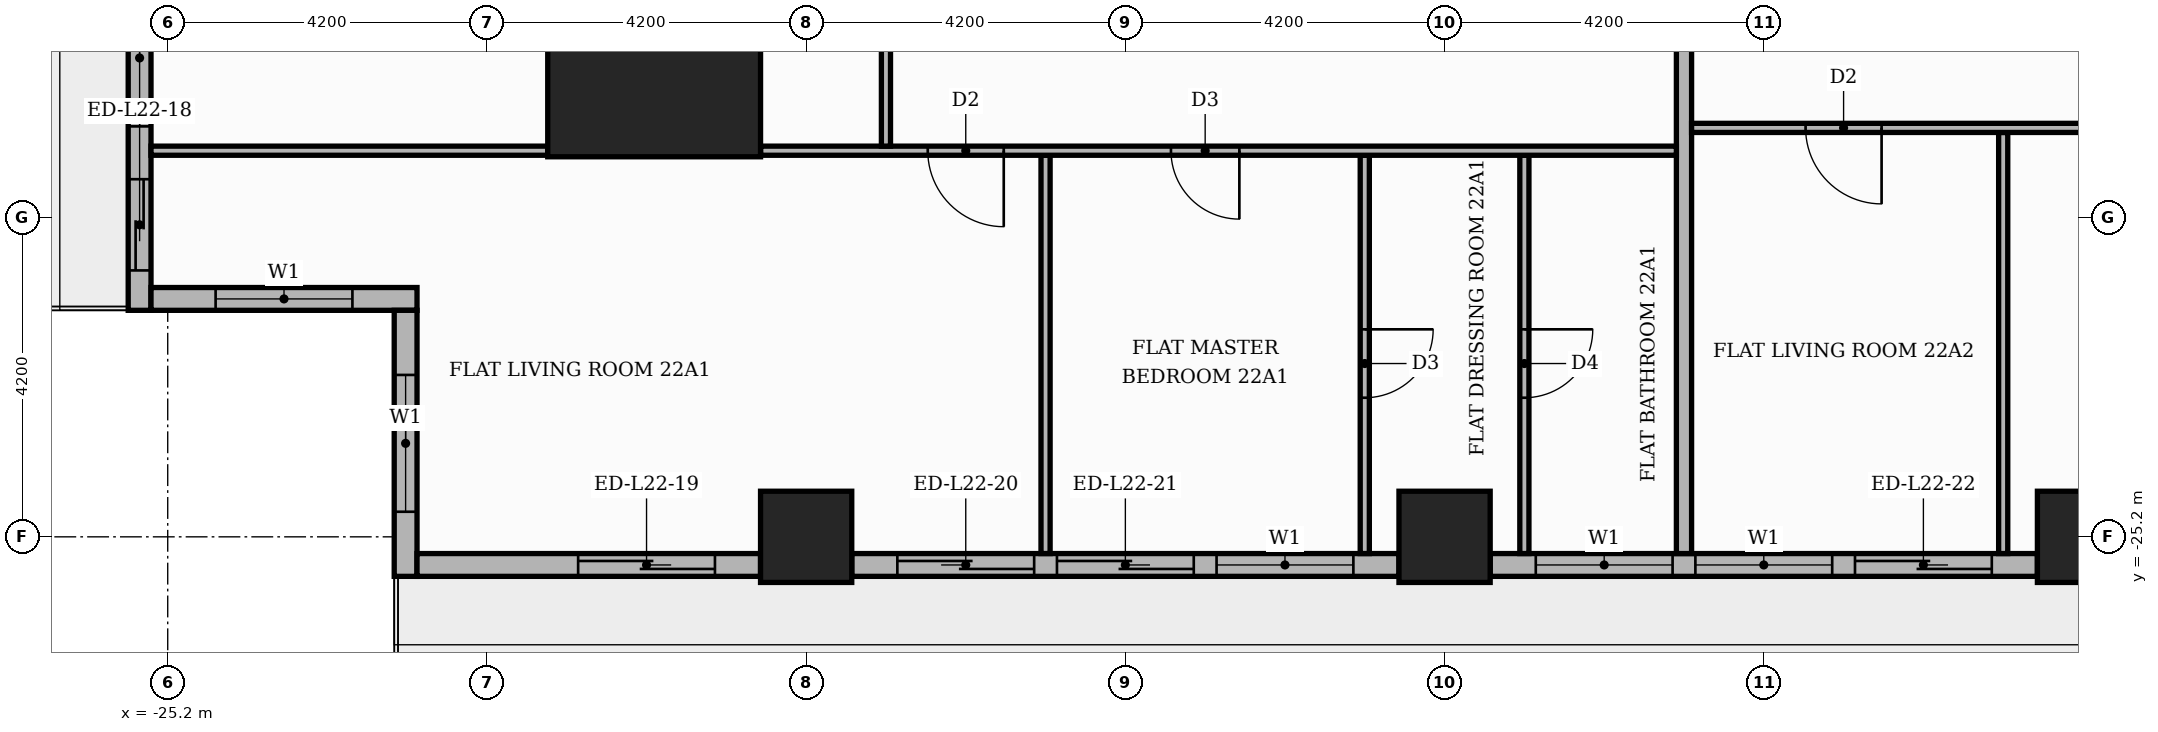
"""IFC4 building model, lengths in metres.
Left out: names, types, materials, properties, quantities, classifications, styles, units other than length and angle.
Written with IfcOpenShell. Run it as: python <this file> out.ifc"""

import sys

from ifc_helpers import new_model, si_unit, direction, frame, frame_2d, origin, origin_2d, place, context, subcontext, project, spatial, rectangle, extrude, element, fill, save


model = new_model("IFC4")
c1 = context("Model", 3, precision=1e-05, world=origin(), true_north=direction((0.0, 1.0)))
c2 = subcontext(c1, "Body", "Model", "MODEL_VIEW")
j1 = project(units=[si_unit("LENGTHUNIT", "METRE"), si_unit("PLANEANGLEUNIT", "RADIAN")], contexts=[c1])
p1 = place(None, origin())
s1 = spatial("IfcSite", under=j1, at=p1, CompositionType="ELEMENT")
p2 = place(p1, origin())
s2 = spatial("IfcBuilding", under=s1, at=p2, CompositionType="ELEMENT")
p3 = place(p2, frame((0.0, 0.0, 94.8)))
s3 = spatial("IfcBuildingStorey", under=s2, at=p3, CompositionType="ELEMENT", Elevation=94.8)
p4 = place(p3, frame((-18.8, -18.8, 0.0), z_axis=(0.0, 0.0, 1.0), x_axis=(1.0, 0.0, 0.0)))
e1 = element("IfcColumn", 1, at=p4, inside=s3, PredefinedType="COLUMN", context=c2, shape_type="SweptSolid", body=[
    extrude(rectangle(XDim=2.8, YDim=2.8, at=origin_2d()), origin(), (0.0, 0.0, 1.0), 3.9),
])
for number, where, z_axis, x_axis in (
    (2, (0.0, -25.2, 0.0), (0.0, 0.0, 1.0), (1.0, 0.0, 0.0)),
    (3, (-8.4, -25.2, 0.0), (0.0, 0.0, 1.0), (1.0, 0.0, 0.0)),
    (4, (-16.8, -25.2, 0.0), (0.0, 0.0, 1.0), (1.0, 0.0, 0.0)),
):
    element("IfcColumn", number, at=place(p3, frame(where, z_axis=z_axis, x_axis=x_axis)), inside=s3, PredefinedType="COLUMN", context=c2, shape_type="SweptSolid", body=[
        extrude(rectangle(XDim=1.2, YDim=1.2, at=origin_2d()), origin(), (0.0, 0.0, 1.0), 3.9),
    ])
p5 = place(p3, frame((-25.57, -17.4, 0.0), z_axis=(0.0, 0.0, 1.0), x_axis=(0.0, -1.0, 0.0)))
e5 = element("IfcWall", 5, at=p5, inside=s3, PredefinedType="STANDARD", context=c2, shape_type="SweptSolid", body=[
    extrude(rectangle(XDim=4.82, YDim=0.3, at=frame_2d((2.41, 0.0))), origin(), (0.0, 0.0, 1.0), 3.48),
])
p6 = place(p5, frame((0.6, 0.0, 0.9)))
e6 = element("IfcOpeningElement", 6, at=p6, cuts=e5, PredefinedType="OPENING", context=c2, shape_type="SweptSolid", body=[
    extrude(rectangle(XDim=1.8, YDim=2.1, at=frame_2d((0.9, 1.05))), frame((0.0, 0.16, 0.0), z_axis=(0.0, -1.0, 0.0), x_axis=(1.0, 0.0, 0.0)), (0.0, 0.0, 1.0), 0.32),
])
p7 = place(p5, frame((3.095, 0.0, 0.0)))
e7 = element("IfcOpeningElement", 7, at=p7, cuts=e5, PredefinedType="OPENING", context=c2, shape_type="SweptSolid", body=[
    extrude(rectangle(XDim=1.2, YDim=2.4, at=frame_2d((0.6, 1.2))), frame((0.0, 0.16, 0.0), z_axis=(0.0, -1.0, 0.0), x_axis=(1.0, 0.0, 0.0)), (0.0, 0.0, 1.0), 0.32),
])
p8 = place(p3, frame((-25.42, -22.07, 0.0), z_axis=(0.0, 0.0, 1.0), x_axis=(1.0, 0.0, 0.0)))
e8 = element("IfcWall", 8, at=p8, inside=s3, PredefinedType="STANDARD", context=c2, shape_type="SweptSolid", body=[
    extrude(rectangle(XDim=3.5, YDim=0.3, at=frame_2d((1.75, 0.0))), origin(), (0.0, 0.0, 1.0), 3.48),
])
p9 = place(p8, frame((0.85, 0.0, 0.9)))
e9 = element("IfcOpeningElement", 9, at=p9, cuts=e8, PredefinedType="OPENING", context=c2, shape_type="SweptSolid", body=[
    extrude(rectangle(XDim=1.8, YDim=2.1, at=frame_2d((0.9, 1.05))), frame((0.0, 0.16, 0.0), z_axis=(0.0, -1.0, 0.0), x_axis=(1.0, 0.0, 0.0)), (0.0, 0.0, 1.0), 0.32),
])
p10 = place(p3, frame((-22.07, -22.22, 0.0), z_axis=(0.0, 0.0, 1.0), x_axis=(0.0, -1.0, 0.0)))
e10 = element("IfcWall", 10, at=p10, inside=s3, PredefinedType="STANDARD", context=c2, shape_type="SweptSolid", body=[
    extrude(rectangle(XDim=3.5, YDim=0.3, at=frame_2d((1.75, 0.0))), origin(), (0.0, 0.0, 1.0), 3.48),
])
p11 = place(p10, frame((0.85, 0.0, 0.9)))
e11 = element("IfcOpeningElement", 11, at=p11, cuts=e10, PredefinedType="OPENING", context=c2, shape_type="SweptSolid", body=[
    extrude(rectangle(XDim=1.8, YDim=2.1, at=frame_2d((0.9, 1.05))), frame((0.0, 0.16, 0.0), z_axis=(0.0, -1.0, 0.0), x_axis=(1.0, 0.0, 0.0)), (0.0, 0.0, 1.0), 0.32),
])
p12 = place(p3, frame((-21.92, -25.57, 0.0), z_axis=(0.0, 0.0, 1.0), x_axis=(1.0, 0.0, 0.0)))
e12 = element("IfcWall", 12, at=p12, inside=s3, PredefinedType="STANDARD", context=c2, shape_type="SweptSolid", body=[
    extrude(rectangle(XDim=4.52, YDim=0.3, at=frame_2d((2.26, 0.0))), origin(), (0.0, 0.0, 1.0), 3.48),
])
p13 = place(p12, frame((2.12, 0.0, 0.0)))
e13 = element("IfcOpeningElement", 13, at=p13, cuts=e12, PredefinedType="OPENING", context=c2, shape_type="SweptSolid", body=[
    extrude(rectangle(XDim=1.8, YDim=2.4, at=frame_2d((0.9, 1.2))), frame((0.0, 0.16, 0.0), z_axis=(0.0, -1.0, 0.0), x_axis=(1.0, 0.0, 0.0)), (0.0, 0.0, 1.0), 0.32),
])
p14 = place(p3, frame((-16.2, -25.57, 0.0), z_axis=(0.0, 0.0, 1.0), x_axis=(1.0, 0.0, 0.0)))
e14 = element("IfcWall", 14, at=p14, inside=s3, PredefinedType="STANDARD", context=c2, shape_type="SweptSolid", body=[
    extrude(rectangle(XDim=7.2, YDim=0.3, at=frame_2d((3.6, 0.0))), origin(), (0.0, 0.0, 1.0), 3.48),
])
p15 = place(p14, frame((0.6, 0.0, 0.0)))
e15 = element("IfcOpeningElement", 15, at=p15, cuts=e14, PredefinedType="OPENING", context=c2, shape_type="SweptSolid", body=[
    extrude(rectangle(XDim=1.8, YDim=2.4, at=frame_2d((0.9, 1.2))), frame((0.0, 0.16, 0.0), z_axis=(0.0, -1.0, 0.0), x_axis=(1.0, 0.0, 0.0)), (0.0, 0.0, 1.0), 0.32),
])
p16 = place(p14, frame((2.7, 0.0, 0.0)))
e16 = element("IfcOpeningElement", 16, at=p16, cuts=e14, PredefinedType="OPENING", context=c2, shape_type="SweptSolid", body=[
    extrude(rectangle(XDim=1.8, YDim=2.4, at=frame_2d((0.9, 1.2))), frame((0.0, 0.16, 0.0), z_axis=(0.0, -1.0, 0.0), x_axis=(1.0, 0.0, 0.0)), (0.0, 0.0, 1.0), 0.32),
])
p17 = place(p14, frame((4.8, 0.0, 0.9)))
e17 = element("IfcOpeningElement", 17, at=p17, cuts=e14, PredefinedType="OPENING", context=c2, shape_type="SweptSolid", body=[
    extrude(rectangle(XDim=1.8, YDim=2.1, at=frame_2d((0.9, 1.05))), frame((0.0, 0.16, 0.0), z_axis=(0.0, -1.0, 0.0), x_axis=(1.0, 0.0, 0.0)), (0.0, 0.0, 1.0), 0.32),
])
p18 = place(p3, frame((-7.8, -25.57, 0.0), z_axis=(0.0, 0.0, 1.0), x_axis=(1.0, 0.0, 0.0)))
e18 = element("IfcWall", 18, at=p18, inside=s3, PredefinedType="STANDARD", context=c2, shape_type="SweptSolid", body=[
    extrude(rectangle(XDim=7.2, YDim=0.3, at=frame_2d((3.6, 0.0))), origin(), (0.0, 0.0, 1.0), 3.48),
])
p19 = place(p18, frame((0.6, 0.0, 0.9)))
e19 = element("IfcOpeningElement", 19, at=p19, cuts=e18, PredefinedType="OPENING", context=c2, shape_type="SweptSolid", body=[
    extrude(rectangle(XDim=1.8, YDim=2.1, at=frame_2d((0.9, 1.05))), frame((0.0, 0.16, 0.0), z_axis=(0.0, -1.0, 0.0), x_axis=(1.0, 0.0, 0.0)), (0.0, 0.0, 1.0), 0.32),
])
p20 = place(p18, frame((2.7, 0.0, 0.9)))
e20 = element("IfcOpeningElement", 20, at=p20, cuts=e18, PredefinedType="OPENING", context=c2, shape_type="SweptSolid", body=[
    extrude(rectangle(XDim=1.8, YDim=2.1, at=frame_2d((0.9, 1.05))), frame((0.0, 0.16, 0.0), z_axis=(0.0, -1.0, 0.0), x_axis=(1.0, 0.0, 0.0)), (0.0, 0.0, 1.0), 0.32),
])
p21 = place(p18, frame((4.8, 0.0, 0.0)))
e21 = element("IfcOpeningElement", 21, at=p21, cuts=e18, PredefinedType="OPENING", context=c2, shape_type="SweptSolid", body=[
    extrude(rectangle(XDim=1.8, YDim=2.4, at=frame_2d((0.9, 1.2))), frame((0.0, 0.16, 0.0), z_axis=(0.0, -1.0, 0.0), x_axis=(1.0, 0.0, 0.0)), (0.0, 0.0, 1.0), 0.32),
])
p22 = place(p3, frame((-13.65, -25.42, 0.0), z_axis=(0.0, 0.0, 1.0), x_axis=(0.0, 1.0, 0.0)))
e22 = element("IfcWall", 22, at=p22, inside=s3, PredefinedType="PARTITIONING", context=c2, shape_type="SweptSolid", body=[
    extrude(rectangle(XDim=5.24, YDim=0.12, at=frame_2d((2.62, 0.0))), origin(), (0.0, 0.0, 1.0), 3.48),
])
p23 = place(p3, frame((-9.45, -25.42, 0.0), z_axis=(0.0, 0.0, 1.0), x_axis=(0.0, 1.0, 0.0)))
e23 = element("IfcWall", 23, at=p23, inside=s3, PredefinedType="PARTITIONING", context=c2, shape_type="SweptSolid", body=[
    extrude(rectangle(XDim=5.24, YDim=0.12, at=frame_2d((2.62, 0.0))), origin(), (0.0, 0.0, 1.0), 3.48),
])
p24 = place(p23, frame((2.05, 0.0, 0.0)))
e24 = element("IfcOpeningElement", 24, at=p24, cuts=e23, PredefinedType="OPENING", context=c2, shape_type="SweptSolid", body=[
    extrude(rectangle(XDim=0.9, YDim=2.1, at=frame_2d((0.45, 1.05))), frame((0.0, 0.07, 0.0), z_axis=(0.0, -1.0, 0.0), x_axis=(1.0, 0.0, 0.0)), (0.0, 0.0, 1.0), 0.14),
])
p25 = place(p3, frame((-7.35, -25.42, 0.0), z_axis=(0.0, 0.0, 1.0), x_axis=(0.0, 1.0, 0.0)))
e25 = element("IfcWall", 25, at=p25, inside=s3, PredefinedType="PARTITIONING", context=c2, shape_type="SweptSolid", body=[
    extrude(rectangle(XDim=5.24, YDim=0.12, at=frame_2d((2.62, 0.0))), origin(), (0.0, 0.0, 1.0), 3.48),
])
p26 = place(p25, frame((2.05, 0.0, 0.0)))
e26 = element("IfcOpeningElement", 26, at=p26, cuts=e25, PredefinedType="OPENING", context=c2, shape_type="SweptSolid", body=[
    extrude(rectangle(XDim=0.9, YDim=2.1, at=frame_2d((0.45, 1.05))), frame((0.0, 0.07, 0.0), z_axis=(0.0, -1.0, 0.0), x_axis=(1.0, 0.0, 0.0)), (0.0, 0.0, 1.0), 0.14),
])
p27 = place(p3, frame((-5.25, -25.42, 0.0), z_axis=(0.0, 0.0, 1.0), x_axis=(0.0, 1.0, 0.0)))
e27 = element("IfcWall", 27, at=p27, inside=s3, PredefinedType="PARTITIONING", context=c2, shape_type="SweptSolid", body=[
    extrude(rectangle(XDim=11.67, YDim=0.2, at=frame_2d((5.835, 0.0))), origin(), (0.0, 0.0, 1.0), 3.48),
])
p28 = place(p3, frame((-1.05, -25.42, 0.0), z_axis=(0.0, 0.0, 1.0), x_axis=(0.0, 1.0, 0.0)))
e28 = element("IfcWall", 28, at=p28, inside=s3, PredefinedType="PARTITIONING", context=c2, shape_type="SweptSolid", body=[
    extrude(rectangle(XDim=5.54, YDim=0.12, at=frame_2d((2.77, 0.0))), origin(), (0.0, 0.0, 1.0), 3.48),
])
p29 = place(p3, frame((-25.42, -20.12, 0.0), z_axis=(0.0, 0.0, 1.0), x_axis=(1.0, 0.0, 0.0)))
e29 = element("IfcWall", 29, at=p29, inside=s3, PredefinedType="PARTITIONING", context=c2, shape_type="SweptSolid", body=[
    extrude(rectangle(XDim=5.22, YDim=0.12, at=frame_2d((2.61, 0.0))), origin(), (0.0, 0.0, 1.0), 3.48),
])
p30 = place(p3, frame((-17.4, -20.12, 0.0), z_axis=(0.0, 0.0, 1.0), x_axis=(1.0, 0.0, 0.0)))
e30 = element("IfcWall", 30, at=p30, inside=s3, PredefinedType="PARTITIONING", context=c2, shape_type="SweptSolid", body=[
    extrude(rectangle(XDim=12.05, YDim=0.12, at=frame_2d((6.025, 0.0))), origin(), (0.0, 0.0, 1.0), 3.48),
])
p31 = place(p30, frame((2.2, 0.0, 0.0)))
e31 = element("IfcOpeningElement", 31, at=p31, cuts=e30, PredefinedType="OPENING", context=c2, shape_type="SweptSolid", body=[
    extrude(rectangle(XDim=1.0, YDim=2.1, at=frame_2d((0.5, 1.05))), frame((0.0, 0.07, 0.0), z_axis=(0.0, -1.0, 0.0), x_axis=(1.0, 0.0, 0.0)), (0.0, 0.0, 1.0), 0.14),
])
p32 = place(p30, frame((5.4, 0.0, 0.0)))
e32 = element("IfcOpeningElement", 32, at=p32, cuts=e30, PredefinedType="OPENING", context=c2, shape_type="SweptSolid", body=[
    extrude(rectangle(XDim=0.9, YDim=2.1, at=frame_2d((0.45, 1.05))), frame((0.0, 0.07, 0.0), z_axis=(0.0, -1.0, 0.0), x_axis=(1.0, 0.0, 0.0)), (0.0, 0.0, 1.0), 0.14),
])
p33 = place(p3, frame((-15.75, -20.06, 0.0), z_axis=(0.0, 0.0, 1.0), x_axis=(0.0, 1.0, 0.0)))
e33 = element("IfcWall", 33, at=p33, inside=s3, PredefinedType="PARTITIONING", context=c2, shape_type="SweptSolid", body=[
    extrude(rectangle(XDim=6.31, YDim=0.12, at=frame_2d((3.155, 0.0))), origin(), (0.0, 0.0, 1.0), 3.48),
])
p34 = place(p33, frame((2.675, 0.0, 0.0)))
e34 = element("IfcOpeningElement", 34, at=p34, cuts=e33, PredefinedType="OPENING", context=c2, shape_type="SweptSolid", body=[
    extrude(rectangle(XDim=1.0, YDim=2.1, at=frame_2d((0.5, 1.05))), frame((0.0, 0.07, 0.0), z_axis=(0.0, -1.0, 0.0), x_axis=(1.0, 0.0, 0.0)), (0.0, 0.0, 1.0), 0.14),
])
p35 = place(p3, frame((-5.15, -19.82, 0.0), z_axis=(0.0, 0.0, 1.0), x_axis=(1.0, 0.0, 0.0)))
e35 = element("IfcWall", 35, at=p35, inside=s3, PredefinedType="PARTITIONING", context=c2, shape_type="SweptSolid", body=[
    extrude(rectangle(XDim=18.7, YDim=0.12, at=frame_2d((9.35, 0.0))), origin(), (0.0, 0.0, 1.0), 3.48),
])
p36 = place(p35, frame((1.5, 0.0, 0.0)))
e36 = element("IfcOpeningElement", 36, at=p36, cuts=e35, PredefinedType="OPENING", context=c2, shape_type="SweptSolid", body=[
    extrude(rectangle(XDim=1.0, YDim=2.1, at=frame_2d((0.5, 1.05))), frame((0.0, 0.07, 0.0), z_axis=(0.0, -1.0, 0.0), x_axis=(1.0, 0.0, 0.0)), (0.0, 0.0, 1.0), 0.14),
])
p37 = place(p35, frame((5.75, 0.0, 0.0)))
e37 = element("IfcOpeningElement", 37, at=p37, cuts=e35, PredefinedType="OPENING", context=c2, shape_type="SweptSolid", body=[
    extrude(rectangle(XDim=0.9, YDim=2.1, at=frame_2d((0.45, 1.05))), frame((0.0, 0.07, 0.0), z_axis=(0.0, -1.0, 0.0), x_axis=(1.0, 0.0, 0.0)), (0.0, 0.0, 1.0), 0.14),
])
p38 = place(p35, frame((14.15, 0.0, 0.0)))
e38 = element("IfcOpeningElement", 38, at=p38, cuts=e35, PredefinedType="OPENING", context=c2, shape_type="SweptSolid", body=[
    extrude(rectangle(XDim=0.9, YDim=2.1, at=frame_2d((0.45, 1.05))), frame((0.0, 0.07, 0.0), z_axis=(0.0, -1.0, 0.0), x_axis=(1.0, 0.0, 0.0)), (0.0, 0.0, 1.0), 0.14),
])
p39 = place(p6, origin())
e39 = element("IfcWindow", 39, at=p39, inside=s3, PartitioningType="SINGLE_PANEL", PredefinedType="WINDOW", context=c2, shape_type="SweptSolid", body=[
    extrude(rectangle(XDim=1.8, YDim=2.1, at=frame_2d((0.9, 1.05))), frame((0.0, 0.03, 0.0), z_axis=(0.0, -1.0, 0.0), x_axis=(1.0, 0.0, 0.0)), (0.0, 0.0, 1.0), 0.06),
])
fill(e6, e39)
p40 = place(p7, origin())
e40 = element("IfcDoor", 40, at=p40, inside=s3, OperationType="SLIDING_TO_RIGHT", PredefinedType="DOOR", context=c2, shape_type="SweptSolid", body=[
    extrude(rectangle(XDim=1.2, YDim=2.4, at=frame_2d((0.6, 1.2))), frame((0.0, 0.025, 0.0), z_axis=(0.0, -1.0, 0.0), x_axis=(1.0, 0.0, 0.0)), (0.0, 0.0, 1.0), 0.05),
])
fill(e7, e40)
p41 = place(p9, origin())
e41 = element("IfcWindow", 41, at=p41, inside=s3, PartitioningType="SINGLE_PANEL", PredefinedType="WINDOW", context=c2, shape_type="SweptSolid", body=[
    extrude(rectangle(XDim=1.8, YDim=2.1, at=frame_2d((0.9, 1.05))), frame((0.0, 0.03, 0.0), z_axis=(0.0, -1.0, 0.0), x_axis=(1.0, 0.0, 0.0)), (0.0, 0.0, 1.0), 0.06),
])
fill(e9, e41)
p42 = place(p11, origin())
e42 = element("IfcWindow", 42, at=p42, inside=s3, PartitioningType="SINGLE_PANEL", PredefinedType="WINDOW", context=c2, shape_type="SweptSolid", body=[
    extrude(rectangle(XDim=1.8, YDim=2.1, at=frame_2d((0.9, 1.05))), frame((0.0, 0.03, 0.0), z_axis=(0.0, -1.0, 0.0), x_axis=(1.0, 0.0, 0.0)), (0.0, 0.0, 1.0), 0.06),
])
fill(e11, e42)
p43 = place(p13, origin())
e43 = element("IfcDoor", 43, at=p43, inside=s3, OperationType="SLIDING_TO_RIGHT", PredefinedType="DOOR", context=c2, shape_type="SweptSolid", body=[
    extrude(rectangle(XDim=1.8, YDim=2.4, at=frame_2d((0.9, 1.2))), frame((0.0, 0.025, 0.0), z_axis=(0.0, -1.0, 0.0), x_axis=(1.0, 0.0, 0.0)), (0.0, 0.0, 1.0), 0.05),
])
fill(e13, e43)
p44 = place(p15, origin())
e44 = element("IfcDoor", 44, at=p44, inside=s3, OperationType="SLIDING_TO_LEFT", PredefinedType="DOOR", context=c2, shape_type="SweptSolid", body=[
    extrude(rectangle(XDim=1.8, YDim=2.4, at=frame_2d((0.9, 1.2))), frame((0.0, 0.025, 0.0), z_axis=(0.0, -1.0, 0.0), x_axis=(1.0, 0.0, 0.0)), (0.0, 0.0, 1.0), 0.05),
])
fill(e15, e44)
p45 = place(p16, origin())
e45 = element("IfcDoor", 45, at=p45, inside=s3, OperationType="SLIDING_TO_RIGHT", PredefinedType="DOOR", context=c2, shape_type="SweptSolid", body=[
    extrude(rectangle(XDim=1.8, YDim=2.4, at=frame_2d((0.9, 1.2))), frame((0.0, 0.025, 0.0), z_axis=(0.0, -1.0, 0.0), x_axis=(1.0, 0.0, 0.0)), (0.0, 0.0, 1.0), 0.05),
])
fill(e16, e45)
p46 = place(p17, origin())
e46 = element("IfcWindow", 46, at=p46, inside=s3, PartitioningType="SINGLE_PANEL", PredefinedType="WINDOW", context=c2, shape_type="SweptSolid", body=[
    extrude(rectangle(XDim=1.8, YDim=2.1, at=frame_2d((0.9, 1.05))), frame((0.0, 0.03, 0.0), z_axis=(0.0, -1.0, 0.0), x_axis=(1.0, 0.0, 0.0)), (0.0, 0.0, 1.0), 0.06),
])
fill(e17, e46)
p47 = place(p19, origin())
e47 = element("IfcWindow", 47, at=p47, inside=s3, PartitioningType="SINGLE_PANEL", PredefinedType="WINDOW", context=c2, shape_type="SweptSolid", body=[
    extrude(rectangle(XDim=1.8, YDim=2.1, at=frame_2d((0.9, 1.05))), frame((0.0, 0.03, 0.0), z_axis=(0.0, -1.0, 0.0), x_axis=(1.0, 0.0, 0.0)), (0.0, 0.0, 1.0), 0.06),
])
fill(e19, e47)
p48 = place(p20, origin())
e48 = element("IfcWindow", 48, at=p48, inside=s3, PartitioningType="SINGLE_PANEL", PredefinedType="WINDOW", context=c2, shape_type="SweptSolid", body=[
    extrude(rectangle(XDim=1.8, YDim=2.1, at=frame_2d((0.9, 1.05))), frame((0.0, 0.03, 0.0), z_axis=(0.0, -1.0, 0.0), x_axis=(1.0, 0.0, 0.0)), (0.0, 0.0, 1.0), 0.06),
])
fill(e20, e48)
p49 = place(p21, origin())
e49 = element("IfcDoor", 49, at=p49, inside=s3, OperationType="SLIDING_TO_RIGHT", PredefinedType="DOOR", context=c2, shape_type="SweptSolid", body=[
    extrude(rectangle(XDim=1.8, YDim=2.4, at=frame_2d((0.9, 1.2))), frame((0.0, 0.025, 0.0), z_axis=(0.0, -1.0, 0.0), x_axis=(1.0, 0.0, 0.0)), (0.0, 0.0, 1.0), 0.05),
])
fill(e21, e49)
p50 = place(p31, frame((1.0, 0.0, 0.0), z_axis=(0.0, 0.0, 1.0), x_axis=(-1.0, 0.0, 0.0)))
e50 = element("IfcDoor", 50, at=p50, inside=s3, OperationType="SINGLE_SWING_RIGHT", PredefinedType="DOOR", context=c2, shape_type="SweptSolid", body=[
    extrude(rectangle(XDim=1.0, YDim=2.1, at=frame_2d((0.5, 1.05))), frame((0.0, 0.025, 0.0), z_axis=(0.0, -1.0, 0.0), x_axis=(1.0, 0.0, 0.0)), (0.0, 0.0, 1.0), 0.05),
])
fill(e31, e50)
p51 = place(p32, frame((0.9, 0.0, 0.0), z_axis=(0.0, 0.0, 1.0), x_axis=(-1.0, 0.0, 0.0)))
e51 = element("IfcDoor", 51, at=p51, inside=s3, OperationType="SINGLE_SWING_RIGHT", PredefinedType="DOOR", context=c2, shape_type="SweptSolid", body=[
    extrude(rectangle(XDim=0.9, YDim=2.1, at=frame_2d((0.45, 1.05))), frame((0.0, 0.025, 0.0), z_axis=(0.0, -1.0, 0.0), x_axis=(1.0, 0.0, 0.0)), (0.0, 0.0, 1.0), 0.05),
])
fill(e32, e51)
p52 = place(p24, frame((0.9, 0.0, 0.0), z_axis=(0.0, 0.0, 1.0), x_axis=(-1.0, 0.0, 0.0)))
e52 = element("IfcDoor", 52, at=p52, inside=s3, OperationType="SINGLE_SWING_RIGHT", PredefinedType="DOOR", context=c2, shape_type="SweptSolid", body=[
    extrude(rectangle(XDim=0.9, YDim=2.1, at=frame_2d((0.45, 1.05))), frame((0.0, 0.025, 0.0), z_axis=(0.0, -1.0, 0.0), x_axis=(1.0, 0.0, 0.0)), (0.0, 0.0, 1.0), 0.05),
])
fill(e24, e52)
p53 = place(p26, frame((0.9, 0.0, 0.0), z_axis=(0.0, 0.0, 1.0), x_axis=(-1.0, 0.0, 0.0)))
e53 = element("IfcDoor", 53, at=p53, inside=s3, OperationType="SINGLE_SWING_RIGHT", PredefinedType="DOOR", context=c2, shape_type="SweptSolid", body=[
    extrude(rectangle(XDim=0.9, YDim=2.1, at=frame_2d((0.45, 1.05))), frame((0.0, 0.025, 0.0), z_axis=(0.0, -1.0, 0.0), x_axis=(1.0, 0.0, 0.0)), (0.0, 0.0, 1.0), 0.05),
])
fill(e26, e53)
p54 = place(p36, frame((1.0, 0.0, 0.0), z_axis=(0.0, 0.0, 1.0), x_axis=(-1.0, 0.0, 0.0)))
e54 = element("IfcDoor", 54, at=p54, inside=s3, OperationType="SINGLE_SWING_RIGHT", PredefinedType="DOOR", context=c2, shape_type="SweptSolid", body=[
    extrude(rectangle(XDim=1.0, YDim=2.1, at=frame_2d((0.5, 1.05))), frame((0.0, 0.025, 0.0), z_axis=(0.0, -1.0, 0.0), x_axis=(1.0, 0.0, 0.0)), (0.0, 0.0, 1.0), 0.05),
])
fill(e36, e54)
save(model, sys.argv[1])
